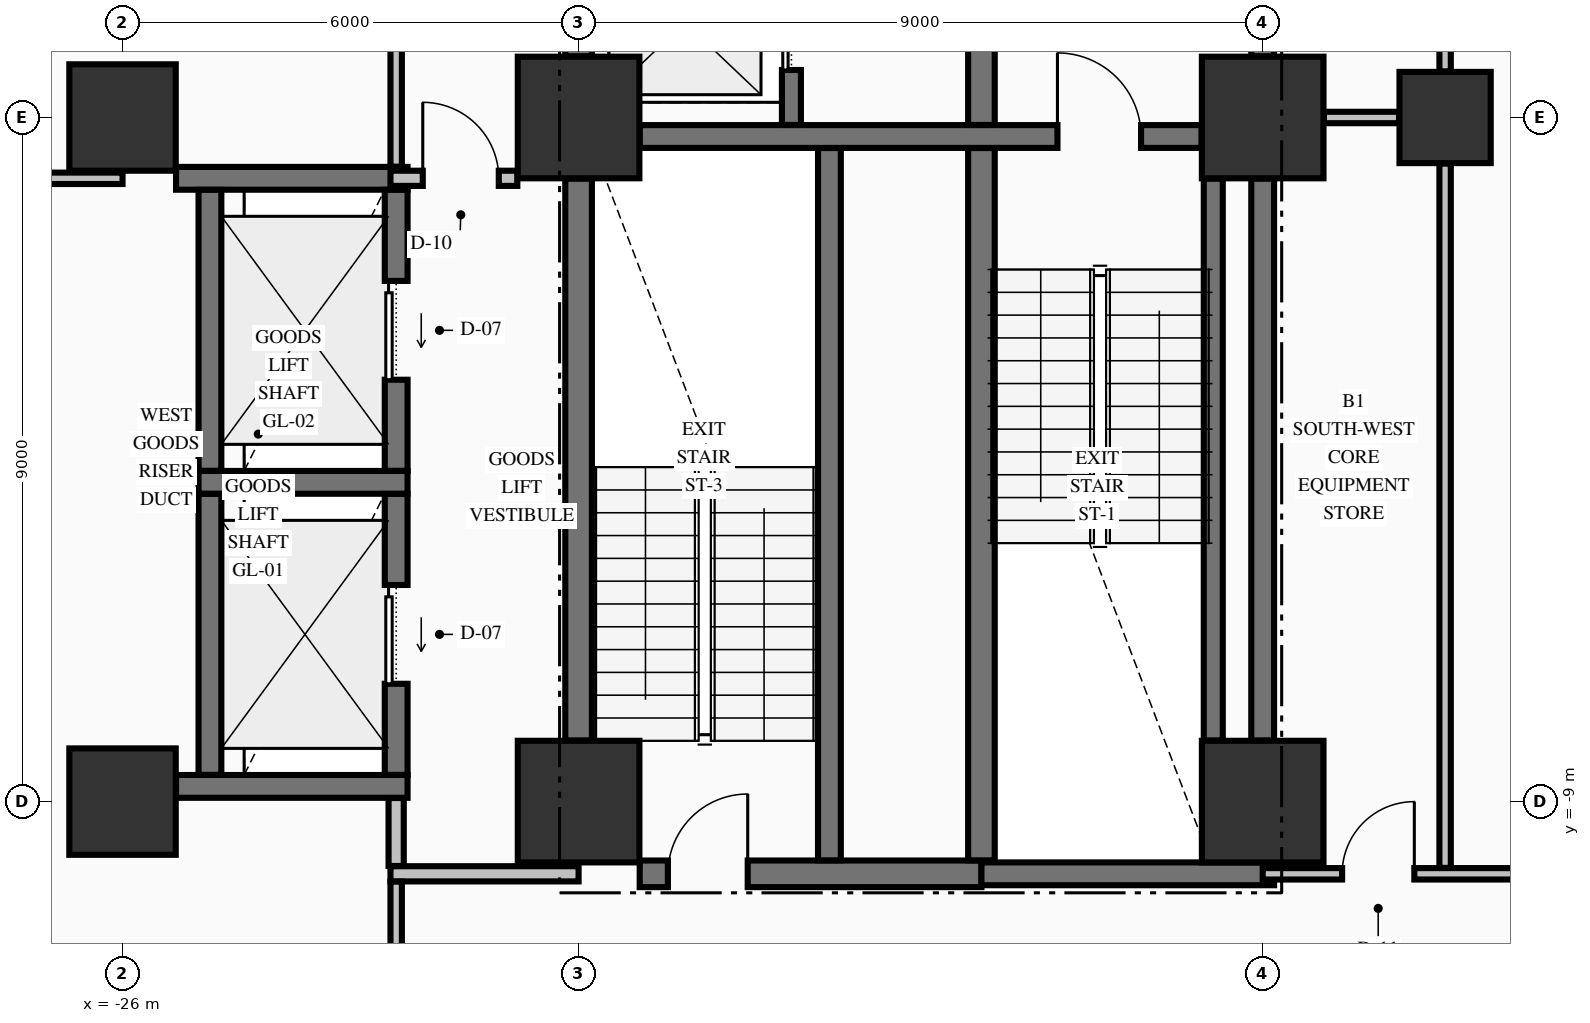
"""IFC4 building model, lengths in metres.
Left out: names, types, materials, properties, quantities, classifications, styles, units other than length and angle.
Written with IfcOpenShell. Run it as: python <this file> out.ifc"""

import sys

from ifc_helpers import new_model, si_unit, direction, frame, frame_2d, origin, origin_2d, place, context, subcontext, project, spatial, rectangle, extrude, element, fill, save


model = new_model("IFC4")
c1 = context("Model", 3, precision=1e-05, world=origin(), true_north=direction((0.0, 1.0)))
c2 = subcontext(c1, "Body", "Model", "MODEL_VIEW")
j1 = project(units=[si_unit("LENGTHUNIT", "METRE"), si_unit("PLANEANGLEUNIT", "RADIAN")], contexts=[c1])
p1 = place(None, origin())
s1 = spatial("IfcSite", under=j1, at=p1, CompositionType="ELEMENT")
p2 = place(p1, origin())
s2 = spatial("IfcBuilding", under=s1, at=p2, CompositionType="ELEMENT")
p3 = place(p2, frame((0.0, 0.0, -4.55)))
s3 = spatial("IfcBuildingStorey", under=s2, at=p3, CompositionType="ELEMENT", Elevation=-4.55)
for number, where, z_axis, x_axis in (
    (1, (-26.0, -9.0, 0.0), (0.0, 0.0, 1.0), (1.0, 0.0, 0.0)),
    (2, (-26.0, 0.0, 0.0), (0.0, 0.0, 1.0), (1.0, 0.0, 0.0)),
):
    element("IfcColumn", number, at=place(p3, frame(where, z_axis=z_axis, x_axis=x_axis)), inside=s3, PredefinedType="COLUMN", context=c2, shape_type="SweptSolid", body=[
        extrude(rectangle(XDim=1.4, YDim=1.4, at=origin_2d()), origin(), (0.0, 0.0, 1.0), 4.2),
    ])
for number, where, z_axis, x_axis in (
    (3, (-20.0, -9.0, 0.0), (0.0, 0.0, 1.0), (1.0, 0.0, 0.0)),
    (4, (-20.0, 0.0, 0.0), (0.0, 0.0, 1.0), (1.0, 0.0, 0.0)),
    (5, (-11.0, -9.0, 0.0), (0.0, 0.0, 1.0), (1.0, 0.0, 0.0)),
    (6, (-11.0, 0.0, 0.0), (0.0, 0.0, 1.0), (1.0, 0.0, 0.0)),
):
    element("IfcColumn", number, at=place(p3, frame(where, z_axis=z_axis, x_axis=x_axis)), inside=s3, PredefinedType="COLUMN", context=c2, shape_type="SweptSolid", body=[
        extrude(rectangle(XDim=1.6, YDim=1.6, at=origin_2d()), origin(), (0.0, 0.0, 1.0), 4.2),
    ])
p4 = place(p3, frame((-8.6, 0.0, 0.0), z_axis=(0.0, 0.0, 1.0), x_axis=(1.0, 0.0, 0.0)))
e7 = element("IfcColumn", 7, at=p4, inside=s3, PredefinedType="COLUMN", context=c2, shape_type="SweptSolid", body=[
    extrude(rectangle(XDim=1.2, YDim=1.2, at=origin_2d()), origin(), (0.0, 0.0, 1.0), 4.2),
])
p5 = place(p3, frame((-19.196, -9.95, 0.0), z_axis=(0.0, 0.0, 1.0), x_axis=(1.0, 0.0, 0.0)))
e8 = element("IfcWall", 8, at=p5, inside=s3, PredefinedType="SHEAR", context=c2, shape_type="SweptSolid", body=[
    extrude(rectangle(XDim=4.496, YDim=0.35, at=frame_2d((2.248, 0.0))), origin(), (0.0, 0.0, 1.0), 4.2),
])
p6 = place(p5, frame((0.371, 0.0, 0.0)))
e9 = element("IfcOpeningElement", 9, at=p6, cuts=e8, PredefinedType="OPENING", context=c2, shape_type="SweptSolid", body=[
    extrude(rectangle(XDim=1.05, YDim=2.15, at=frame_2d((0.525, 1.075))), frame((0.0, 0.185, 0.0), z_axis=(0.0, -1.0, 0.0), x_axis=(1.0, 0.0, 0.0)), (0.0, 0.0, 1.0), 0.37),
])
p7 = place(p3, frame((-14.7, -9.95, 0.0), z_axis=(0.0, 0.0, 1.0), x_axis=(1.0, 0.0, 0.0)))
e10 = element("IfcWall", 10, at=p7, inside=s3, PredefinedType="SHEAR", context=c2, shape_type="SweptSolid", body=[
    extrude(rectangle(XDim=3.85, YDim=0.3, at=frame_2d((1.925, 0.0))), origin(), (0.0, 0.0, 1.0), 4.2),
])
p8 = place(p3, frame((-25.296, -8.8, 0.0), z_axis=(0.0, 0.0, 1.0), x_axis=(1.0, 0.0, 0.0)))
e11 = element("IfcWall", 11, at=p8, inside=s3, PredefinedType="SHEAR", context=c2, shape_type="SweptSolid", body=[
    extrude(rectangle(XDim=3.046, YDim=0.3, at=frame_2d((1.523, 0.0))), origin(), (0.0, 0.0, 1.0), 4.2),
])
p9 = place(p3, frame((-25.0, -4.8, 0.0), z_axis=(0.0, 0.0, 1.0), x_axis=(1.0, 0.0, 0.0)))
e12 = element("IfcWall", 12, at=p9, inside=s3, PredefinedType="SHEAR", context=c2, shape_type="SweptSolid", body=[
    extrude(rectangle(XDim=2.75, YDim=0.3, at=frame_2d((1.375, 0.0))), origin(), (0.0, 0.0, 1.0), 4.2),
])
p10 = place(p3, frame((-25.296, -0.8, 0.0), z_axis=(0.0, 0.0, 1.0), x_axis=(1.0, 0.0, 0.0)))
e13 = element("IfcWall", 13, at=p10, inside=s3, PredefinedType="SHEAR", context=c2, shape_type="SweptSolid", body=[
    extrude(rectangle(XDim=3.046, YDim=0.3, at=frame_2d((1.523, 0.0))), origin(), (0.0, 0.0, 1.0), 4.2),
])
p11 = place(p3, frame((-19.196, -0.25, 0.0), z_axis=(0.0, 0.0, 1.0), x_axis=(1.0, 0.0, 0.0)))
e14 = element("IfcWall", 14, at=p11, inside=s3, PredefinedType="SHEAR", context=c2, shape_type="SweptSolid", body=[
    extrude(rectangle(XDim=7.392, YDim=0.3, at=frame_2d((3.696, 0.0))), origin(), (0.0, 0.0, 1.0), 4.2),
])
p12 = place(p11, frame((5.496, 0.0, 0.0)))
e15 = element("IfcOpeningElement", 15, at=p12, cuts=e14, PredefinedType="OPENING", context=c2, shape_type="SweptSolid", body=[
    extrude(rectangle(XDim=1.1, YDim=2.15, at=frame_2d((0.55, 1.075))), frame((0.0, 0.16, 0.0), z_axis=(0.0, -1.0, 0.0), x_axis=(1.0, 0.0, 0.0)), (0.0, 0.0, 1.0), 0.32),
])
p13 = place(p3, frame((-22.475, -9.95, 0.0), z_axis=(0.0, 0.0, 1.0), x_axis=(1.0, 0.0, 0.0)))
e16 = element("IfcWall", 16, at=p13, inside=s3, PredefinedType="PARTITIONING", context=c2, shape_type="SweptSolid", body=[
    extrude(rectangle(XDim=2.475, YDim=0.2, at=frame_2d((1.238, 0.0))), origin(), (0.0, 0.0, 1.0), 4.2),
])
p14 = place(p3, frame((-11.0, -9.95, 0.0), z_axis=(0.0, 0.0, 1.0), x_axis=(1.0, 0.0, 0.0)))
e17 = element("IfcWall", 17, at=p14, inside=s3, PredefinedType="PARTITIONING", context=c2, shape_type="SweptSolid", body=[
    extrude(rectangle(XDim=22.0, YDim=0.15, at=frame_2d((11.0, 0.0))), origin(), (0.0, 0.0, 1.0), 4.2),
])
p15 = place(p14, frame((1.045, 0.0, 0.0)))
e18 = element("IfcOpeningElement", 18, at=p15, cuts=e17, PredefinedType="OPENING", context=c2, shape_type="SweptSolid", body=[
    extrude(rectangle(XDim=0.95, YDim=2.15, at=frame_2d((0.475, 1.075))), frame((0.0, 0.085, 0.0), z_axis=(0.0, -1.0, 0.0), x_axis=(1.0, 0.0, 0.0)), (0.0, 0.0, 1.0), 0.17),
])
p16 = place(p14, frame((20.005, 0.0, 0.0)))
e19 = element("IfcOpeningElement", 19, at=p16, cuts=e17, PredefinedType="OPENING", context=c2, shape_type="SweptSolid", body=[
    extrude(rectangle(XDim=0.95, YDim=2.15, at=frame_2d((0.475, 1.075))), frame((0.0, 0.085, 0.0), z_axis=(0.0, -1.0, 0.0), x_axis=(1.0, 0.0, 0.0)), (0.0, 0.0, 1.0), 0.17),
])
p17 = place(p3, frame((-33.722, -0.8, 0.0), z_axis=(0.0, 0.0, 1.0), x_axis=(1.0, 0.0, 0.0)))
e20 = element("IfcWall", 20, at=p17, inside=s3, PredefinedType="PARTITIONING", context=c2, shape_type="SweptSolid", body=[
    extrude(rectangle(XDim=7.722, YDim=0.15, at=frame_2d((3.861, 0.0))), origin(), (0.0, 0.0, 1.0), 4.2),
])
p18 = place(p3, frame((-22.475, -0.8, 0.0), z_axis=(0.0, 0.0, 1.0), x_axis=(1.0, 0.0, 0.0)))
e21 = element("IfcWall", 21, at=p18, inside=s3, PredefinedType="PARTITIONING", context=c2, shape_type="SweptSolid", body=[
    extrude(rectangle(XDim=1.669, YDim=0.2, at=frame_2d((0.834, 0.0))), origin(), (0.0, 0.0, 1.0), 4.2),
])
p19 = place(p18, frame((0.425, 0.0, 0.0)))
e22 = element("IfcOpeningElement", 22, at=p19, cuts=e21, PredefinedType="OPENING", context=c2, shape_type="SweptSolid", body=[
    extrude(rectangle(XDim=1.0, YDim=2.15, at=frame_2d((0.5, 1.075))), frame((0.0, 0.11, 0.0), z_axis=(0.0, -1.0, 0.0), x_axis=(1.0, 0.0, 0.0)), (0.0, 0.0, 1.0), 0.22),
])
p20 = place(p3, frame((-10.194, 0.0, 0.0), z_axis=(0.0, 0.0, 1.0), x_axis=(1.0, 0.0, 0.0)))
e23 = element("IfcWall", 23, at=p20, inside=s3, PredefinedType="PARTITIONING", context=c2, shape_type="SweptSolid", body=[
    extrude(rectangle(XDim=0.988, YDim=0.15, at=frame_2d((0.494, 0.0))), origin(), (0.0, 0.0, 1.0), 3.242),
])
for number, where, z_axis, x_axis in (
    (24, (-24.85, -8.648, 0.0), (0.0, 0.0, 1.0), (0.0, 1.0, 0.0)),
    (25, (-24.85, -4.648, 0.0), (0.0, 0.0, 1.0), (0.0, 1.0, 0.0)),
):
    element("IfcWall", number, at=place(p3, frame(where, z_axis=z_axis, x_axis=x_axis)), inside=s3, PredefinedType="SHEAR", context=c2, shape_type="SweptSolid", body=[
        extrude(rectangle(XDim=3.696, YDim=0.3, at=frame_2d((1.848, 0.0))), origin(), (0.0, 0.0, 1.0), 4.2),
    ])
p21 = place(p3, frame((-22.4, -8.648, 0.0), z_axis=(0.0, 0.0, 1.0), x_axis=(0.0, 1.0, 0.0)))
e26 = element("IfcWall", 26, at=p21, inside=s3, PredefinedType="SHEAR", context=c2, shape_type="SweptSolid", body=[
    extrude(rectangle(XDim=3.696, YDim=0.3, at=frame_2d((1.848, 0.0))), origin(), (0.0, 0.0, 1.0), 4.2),
])
p22 = place(p21, frame((1.198, 0.0, 0.0)))
e27 = element("IfcOpeningElement", 27, at=p22, cuts=e26, PredefinedType="OPENING", context=c2, shape_type="SweptSolid", body=[
    extrude(rectangle(XDim=1.3, YDim=2.3, at=frame_2d((0.65, 1.15))), frame((0.0, 0.16, 0.0), z_axis=(0.0, -1.0, 0.0), x_axis=(1.0, 0.0, 0.0)), (0.0, 0.0, 1.0), 0.32),
])
p23 = place(p3, frame((-22.4, -4.648, 0.0), z_axis=(0.0, 0.0, 1.0), x_axis=(0.0, 1.0, 0.0)))
e28 = element("IfcWall", 28, at=p23, inside=s3, PredefinedType="SHEAR", context=c2, shape_type="SweptSolid", body=[
    extrude(rectangle(XDim=3.696, YDim=0.3, at=frame_2d((1.848, 0.0))), origin(), (0.0, 0.0, 1.0), 4.2),
])
p24 = place(p23, frame((1.198, 0.0, 0.0)))
e29 = element("IfcOpeningElement", 29, at=p24, cuts=e28, PredefinedType="OPENING", context=c2, shape_type="SweptSolid", body=[
    extrude(rectangle(XDim=1.3, YDim=2.3, at=frame_2d((0.65, 1.15))), frame((0.0, 0.16, 0.0), z_axis=(0.0, -1.0, 0.0), x_axis=(1.0, 0.0, 0.0)), (0.0, 0.0, 1.0), 0.32),
])
p25 = place(p3, frame((-20.0, -8.196, 0.0), z_axis=(0.0, 0.0, 1.0), x_axis=(0.0, 1.0, 0.0)))
e30 = element("IfcWall", 30, at=p25, inside=s3, PredefinedType="SHEAR", context=c2, shape_type="SweptSolid", body=[
    extrude(rectangle(XDim=7.392, YDim=0.35, at=frame_2d((3.696, 0.0))), origin(), (0.0, 0.0, 1.0), 4.2),
])
p26 = place(p3, frame((-20.0, 0.804, 0.0), z_axis=(0.0, 0.0, 1.0), x_axis=(0.0, 1.0, 0.0)))
e31 = element("IfcWall", 31, at=p26, inside=s3, PredefinedType="SHEAR", context=c2, shape_type="SweptSolid", body=[
    extrude(rectangle(XDim=1.669, YDim=0.35, at=frame_2d((0.834, 0.0))), origin(), (0.0, 0.0, 1.0), 4.2),
])
p27 = place(p3, frame((-17.2, -0.098, 0.0), z_axis=(0.0, 0.0, 1.0), x_axis=(0.0, 1.0, 0.0)))
e32 = element("IfcWall", 32, at=p27, inside=s3, PredefinedType="SOLIDWALL", context=c2, shape_type="SweptSolid", body=[
    extrude(rectangle(XDim=2.571, YDim=0.25, at=frame_2d((1.285, 0.0))), origin(), (0.0, 0.0, 1.0), 4.2),
])
p28 = place(p27, frame((0.723, 0.0, 0.0)))
e33 = element("IfcOpeningElement", 33, at=p28, cuts=e32, PredefinedType="OPENING", context=c2, shape_type="SweptSolid", body=[
    extrude(rectangle(XDim=1.1, YDim=2.2, at=frame_2d((0.55, 1.1))), frame((0.0, 0.135, 0.0), z_axis=(0.0, -1.0, 0.0), x_axis=(1.0, 0.0, 0.0)), (0.0, 0.0, 1.0), 0.27),
])
p29 = place(p3, frame((-16.7, -9.773, 0.0), z_axis=(0.0, 0.0, 1.0), x_axis=(0.0, 1.0, 0.0)))
e34 = element("IfcWall", 34, at=p29, inside=s3, PredefinedType="SHEAR", context=c2, shape_type="SweptSolid", body=[
    extrude(rectangle(XDim=9.371, YDim=0.3, at=frame_2d((4.686, 0.0))), origin(), (0.0, 0.0, 1.0), 4.2),
])
p30 = place(p3, frame((-14.7, -9.773, 0.0), z_axis=(0.0, 0.0, 1.0), x_axis=(0.0, 1.0, 0.0)))
e35 = element("IfcWall", 35, at=p30, inside=s3, PredefinedType="SHEAR", context=c2, shape_type="SweptSolid", body=[
    extrude(rectangle(XDim=9.371, YDim=0.35, at=frame_2d((4.686, 0.0))), origin(), (0.0, 0.0, 1.0), 4.2),
])
p31 = place(p3, frame((-14.7, -0.098, 0.0), z_axis=(0.0, 0.0, 1.0), x_axis=(0.0, 1.0, 0.0)))
e36 = element("IfcWall", 36, at=p31, inside=s3, PredefinedType="SHEAR", context=c2, shape_type="SweptSolid", body=[
    extrude(rectangle(XDim=2.846, YDim=0.35, at=frame_2d((1.423, 0.0))), origin(), (0.0, 0.0, 1.0), 4.2),
])
p32 = place(p3, frame((-11.65, -8.196, 0.0), z_axis=(0.0, 0.0, 1.0), x_axis=(0.0, 1.0, 0.0)))
e37 = element("IfcWall", 37, at=p32, inside=s3, PredefinedType="SOLIDWALL", context=c2, shape_type="SweptSolid", body=[
    extrude(rectangle(XDim=7.392, YDim=0.25, at=frame_2d((3.696, 0.0))), origin(), (0.0, 0.0, 1.0), 4.2),
])
p33 = place(p3, frame((-11.0, -8.196, 0.0), z_axis=(0.0, 0.0, 1.0), x_axis=(0.0, 1.0, 0.0)))
e38 = element("IfcWall", 38, at=p33, inside=s3, PredefinedType="SHEAR", context=c2, shape_type="SweptSolid", body=[
    extrude(rectangle(XDim=7.392, YDim=0.3, at=frame_2d((3.696, 0.0))), origin(), (0.0, 0.0, 1.0), 4.2),
])
p34 = place(p3, frame((-11.0, 0.804, 0.0), z_axis=(0.0, 0.0, 1.0), x_axis=(0.0, 1.0, 0.0)))
e39 = element("IfcWall", 39, at=p34, inside=s3, PredefinedType="SHEAR", context=c2, shape_type="SweptSolid", body=[
    extrude(rectangle(XDim=1.944, YDim=0.3, at=frame_2d((0.972, 0.0))), origin(), (0.0, 0.0, 1.0), 4.2),
])
p35 = place(p34, frame((0.296, 0.0, 0.0)))
e40 = element("IfcOpeningElement", 40, at=p35, cuts=e39, PredefinedType="OPENING", context=c2, shape_type="SweptSolid", body=[
    extrude(rectangle(XDim=1.1, YDim=2.15, at=frame_2d((0.55, 1.075))), frame((0.0, 0.16, 0.0), z_axis=(0.0, -1.0, 0.0), x_axis=(1.0, 0.0, 0.0)), (0.0, 0.0, 1.0), 0.32),
])
p36 = place(p3, frame((-22.4, -12.522, 0.0), z_axis=(0.0, 0.0, 1.0), x_axis=(0.0, 1.0, 0.0)))
e41 = element("IfcWall", 41, at=p36, inside=s3, PredefinedType="PARTITIONING", context=c2, shape_type="SweptSolid", body=[
    extrude(rectangle(XDim=2.469, YDim=0.15, at=frame_2d((1.234, 0.0))), origin(), (0.0, 0.0, 1.0), 4.2),
])
p37 = place(p3, frame((-22.4, -9.847, 0.0), z_axis=(0.0, 0.0, 1.0), x_axis=(0.0, 1.0, 0.0)))
e42 = element("IfcWall", 42, at=p37, inside=s3, PredefinedType="PARTITIONING", context=c2, shape_type="SweptSolid", body=[
    extrude(rectangle(XDim=0.894, YDim=0.2, at=frame_2d((0.447, 0.0))), origin(), (0.0, 0.0, 1.0), 4.2),
])
p38 = place(p3, frame((-22.4, -0.647, 0.0), z_axis=(0.0, 0.0, 1.0), x_axis=(0.0, 1.0, 0.0)))
e43 = element("IfcWall", 43, at=p38, inside=s3, PredefinedType="PARTITIONING", context=c2, shape_type="SweptSolid", body=[
    extrude(rectangle(XDim=11.069, YDim=0.15, at=frame_2d((5.535, 0.0))), origin(), (0.0, 0.0, 1.0), 4.2),
])
p39 = place(p38, frame((4.547, 0.0, 0.0)))
e44 = element("IfcOpeningElement", 44, at=p39, cuts=e43, PredefinedType="OPENING", context=c2, shape_type="SweptSolid", body=[
    extrude(rectangle(XDim=1.2, YDim=2.15, at=frame_2d((0.6, 1.075))), frame((0.0, 0.085, 0.0), z_axis=(0.0, -1.0, 0.0), x_axis=(1.0, 0.0, 0.0)), (0.0, 0.0, 1.0), 0.17),
])
p40 = place(p3, frame((-8.6, -9.872, 0.0), z_axis=(0.0, 0.0, 1.0), x_axis=(0.0, 1.0, 0.0)))
e45 = element("IfcWall", 45, at=p40, inside=s3, PredefinedType="PARTITIONING", context=c2, shape_type="SweptSolid", body=[
    extrude(rectangle(XDim=9.266, YDim=0.15, at=frame_2d((4.633, 0.0))), origin(), (0.0, 0.0, 1.0), 3.242),
])
p41 = place(p3, frame((-8.6, 0.606, 0.0), z_axis=(0.0, 0.0, 1.0), x_axis=(0.0, 1.0, 0.0)))
e46 = element("IfcWall", 46, at=p41, inside=s3, PredefinedType="PARTITIONING", context=c2, shape_type="SweptSolid", body=[
    extrude(rectangle(XDim=9.816, YDim=0.15, at=frame_2d((4.908, 0.0))), origin(), (0.0, 0.0, 1.0), 3.242),
])
p42 = place(p41, frame((3.344, 0.0, 0.0)))
e47 = element("IfcOpeningElement", 47, at=p42, cuts=e46, PredefinedType="OPENING", context=c2, shape_type="SweptSolid", body=[
    extrude(rectangle(XDim=1.1, YDim=2.15, at=frame_2d((0.55, 1.075))), frame((0.0, 0.085, 0.0), z_axis=(0.0, -1.0, 0.0), x_axis=(1.0, 0.0, 0.0)), (0.0, 0.0, 1.0), 0.17),
])
p43 = place(p12, origin())
e48 = element("IfcDoor", 48, at=p43, inside=s3, OperationType="SINGLE_SWING_LEFT", PredefinedType="DOOR", context=c2, shape_type="SweptSolid", body=[
    extrude(rectangle(XDim=1.1, YDim=2.15, at=frame_2d((0.55, 1.075))), frame((0.0, 0.025, 0.0), z_axis=(0.0, -1.0, 0.0), x_axis=(1.0, 0.0, 0.0)), (0.0, 0.0, 1.0), 0.05),
])
fill(e15, e48)
p44 = place(p6, origin())
e49 = element("IfcDoor", 49, at=p44, inside=s3, OperationType="SINGLE_SWING_RIGHT", PredefinedType="DOOR", context=c2, shape_type="SweptSolid", body=[
    extrude(rectangle(XDim=1.05, YDim=2.15, at=frame_2d((0.525, 1.075))), frame((0.0, 0.025, 0.0), z_axis=(0.0, -1.0, 0.0), x_axis=(1.0, 0.0, 0.0)), (0.0, 0.0, 1.0), 0.05),
])
fill(e9, e49)
p45 = place(p28, origin())
e50 = element("IfcDoor", 50, at=p45, inside=s3, OperationType="SLIDING_TO_LEFT", PredefinedType="DOOR", context=c2, shape_type="SweptSolid", body=[
    extrude(rectangle(XDim=1.1, YDim=2.2, at=frame_2d((0.55, 1.1))), frame((0.0, 0.025, 0.0), z_axis=(0.0, -1.0, 0.0), x_axis=(1.0, 0.0, 0.0)), (0.0, 0.0, 1.0), 0.05),
])
fill(e33, e50)
p46 = place(p22, origin())
e51 = element("IfcDoor", 51, at=p46, inside=s3, OperationType="SLIDING_TO_LEFT", PredefinedType="DOOR", context=c2, shape_type="SweptSolid", body=[
    extrude(rectangle(XDim=1.3, YDim=2.3, at=frame_2d((0.65, 1.15))), frame((0.0, 0.025, 0.0), z_axis=(0.0, -1.0, 0.0), x_axis=(1.0, 0.0, 0.0)), (0.0, 0.0, 1.0), 0.05),
])
fill(e27, e51)
p47 = place(p24, origin())
e52 = element("IfcDoor", 52, at=p47, inside=s3, OperationType="SLIDING_TO_LEFT", PredefinedType="DOOR", context=c2, shape_type="SweptSolid", body=[
    extrude(rectangle(XDim=1.3, YDim=2.3, at=frame_2d((0.65, 1.15))), frame((0.0, 0.025, 0.0), z_axis=(0.0, -1.0, 0.0), x_axis=(1.0, 0.0, 0.0)), (0.0, 0.0, 1.0), 0.05),
])
fill(e29, e52)
p48 = place(p19, origin())
e53 = element("IfcDoor", 53, at=p48, inside=s3, OperationType="SINGLE_SWING_LEFT", PredefinedType="DOOR", context=c2, shape_type="SweptSolid", body=[
    extrude(rectangle(XDim=1.0, YDim=2.15, at=frame_2d((0.5, 1.075))), frame((0.0, 0.025, 0.0), z_axis=(0.0, -1.0, 0.0), x_axis=(1.0, 0.0, 0.0)), (0.0, 0.0, 1.0), 0.05),
])
fill(e22, e53)
p49 = place(p15, origin())
e54 = element("IfcDoor", 54, at=p49, inside=s3, OperationType="SINGLE_SWING_RIGHT", PredefinedType="DOOR", context=c2, shape_type="SweptSolid", body=[
    extrude(rectangle(XDim=0.95, YDim=2.15, at=frame_2d((0.475, 1.075))), frame((0.0, 0.025, 0.0), z_axis=(0.0, -1.0, 0.0), x_axis=(1.0, 0.0, 0.0)), (0.0, 0.0, 1.0), 0.05),
])
fill(e18, e54)
save(model, sys.argv[1])
